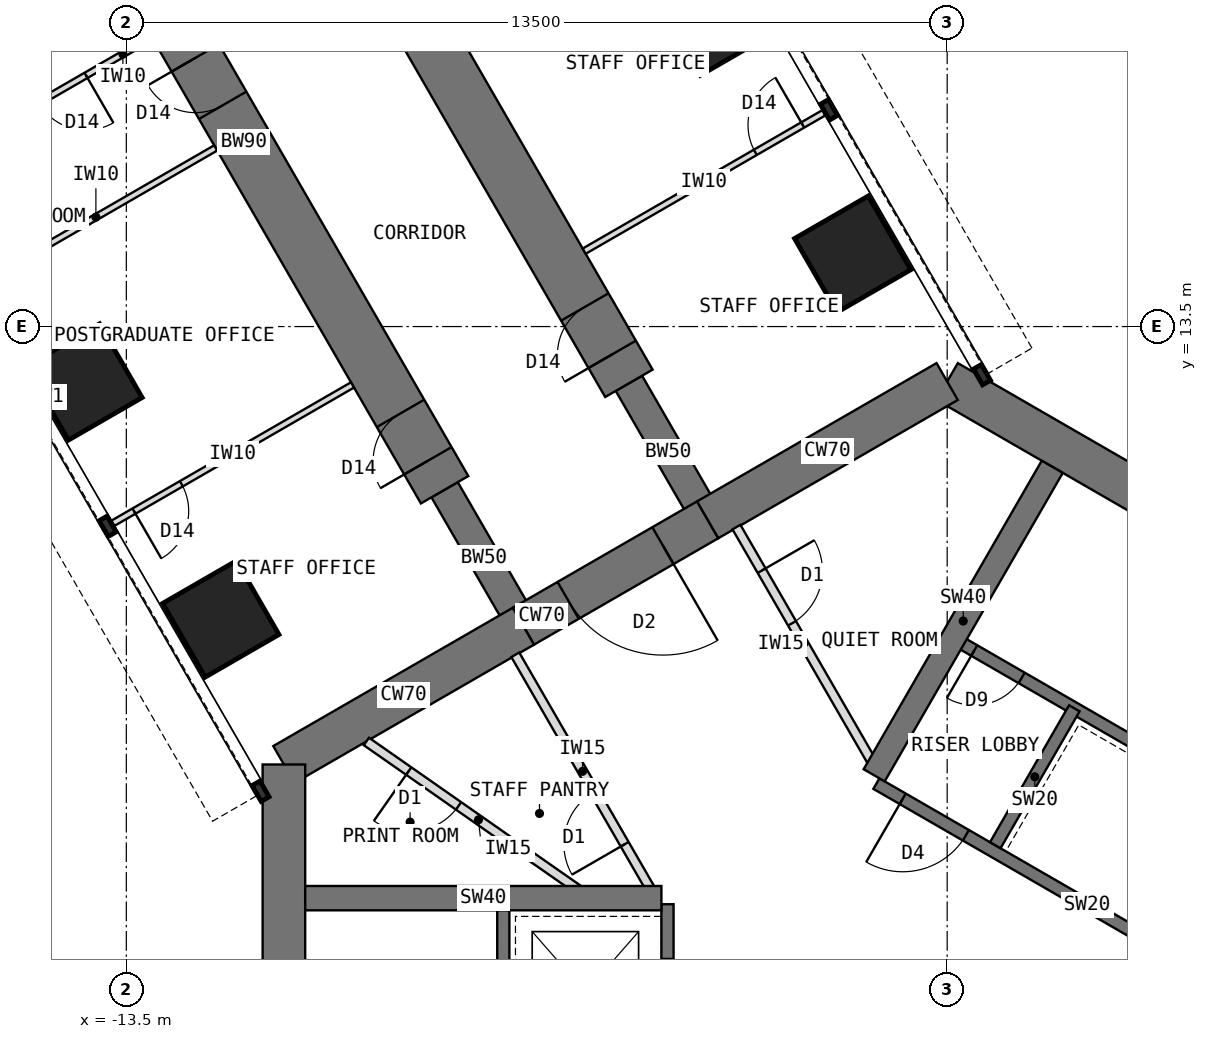
"""IFC4 building model, lengths in metres.
Left out: names, types, materials, properties, quantities, classifications, styles, units other than length and angle.
Written with IfcOpenShell. Run it as: python <this file> out.ifc"""

import sys

from ifc_helpers import new_model, si_unit, direction, frame, frame_2d, origin, origin_2d, place, context, subcontext, project, spatial, rectangle, extrude, element, fill, save


model = new_model("IFC4")
c1 = context("Model", 3, precision=1e-05, world=origin(), true_north=direction((0.0, 1.0)))
c2 = subcontext(c1, "Body", "Model", "MODEL_VIEW")
j1 = project(units=[si_unit("LENGTHUNIT", "METRE"), si_unit("PLANEANGLEUNIT", "RADIAN")], contexts=[c1])
p1 = place(None, origin())
s1 = spatial("IfcSite", under=j1, at=p1, CompositionType="ELEMENT")
p2 = place(p1, origin())
s2 = spatial("IfcBuilding", under=s1, at=p2, CompositionType="ELEMENT")
p3 = place(p2, frame((0.0, 0.0, 84.5)))
s3 = spatial("IfcBuildingStorey", under=s2, at=p3, CompositionType="ELEMENT", Elevation=84.5)
p4 = place(p3, frame((10.908, 6.298, 0.0), z_axis=(0.0, 0.0, 1.0), x_axis=(-0.866021940709, 0.500005998175, 0.0)))
e1 = element("IfcWall", 1, at=p4, inside=s3, PredefinedType="SHEAR", context=c2, shape_type="SweptSolid", body=[
    extrude(rectangle(XDim=12.596, YDim=0.7, at=frame_2d((6.298, 0.0))), origin(), (0.0, 0.0, 1.0), 4.0),
])
p5 = place(p3, frame((0.0, 12.596, 0.0), z_axis=(0.0, 0.0, 1.0), x_axis=(-0.866011268655, -0.500024481964, 0.0)))
e2 = element("IfcWall", 2, at=p5, inside=s3, PredefinedType="SHEAR", context=c2, shape_type="SweptSolid", body=[
    extrude(rectangle(XDim=4.548, YDim=0.7, at=frame_2d((2.274, 0.0))), origin(), (0.0, 0.0, 1.0), 4.0),
])
p6 = place(p3, frame((-3.939, 10.322, 0.0), z_axis=(0.0, 0.0, 1.0), x_axis=(-0.866019471182, -0.500010275428, 0.0)))
e3 = element("IfcWall", 3, at=p6, inside=s3, PredefinedType="SHEAR", context=c2, shape_type="SweptSolid", body=[
    extrude(rectangle(XDim=3.5, YDim=0.7, at=frame_2d((1.75, 0.0))), origin(), (0.0, 0.0, 1.0), 4.0),
])
p7 = place(p6, frame((0.85, 0.0, 0.0)))
e4 = element("IfcOpeningElement", 4, at=p7, cuts=e3, PredefinedType="OPENING", context=c2, shape_type="SweptSolid", body=[
    extrude(rectangle(XDim=1.8, YDim=2.1, at=frame_2d((0.9, 1.05))), frame((0.0, 0.36, 0.0), z_axis=(0.0, -1.0, 0.0), x_axis=(1.0, 0.0, 0.0)), (0.0, 0.0, 1.0), 0.72),
])
p8 = place(p3, frame((-6.97, 8.572, 0.0), z_axis=(0.0, 0.0, 1.0), x_axis=(-0.866034513004, -0.499984222037, 0.0)))
e5 = element("IfcWall", 5, at=p8, inside=s3, PredefinedType="SHEAR", context=c2, shape_type="SweptSolid", body=[
    extrude(rectangle(XDim=4.548, YDim=0.7, at=frame_2d((2.274, 0.0))), origin(), (0.0, 0.0, 1.0), 4.0),
])
p9 = place(p3, frame((-10.908, 6.298, 0.0), z_axis=(0.0, 0.0, 1.0), x_axis=(0.0, -1.0, 0.0)))
e6 = element("IfcWall", 6, at=p9, inside=s3, PredefinedType="SHEAR", context=c2, shape_type="SweptSolid", body=[
    extrude(rectangle(XDim=12.596, YDim=0.7, at=frame_2d((6.298, 0.0))), origin(), (0.0, 0.0, 1.0), 4.0),
])
p10 = place(p3, frame((-6.97, 8.572, 0.0), z_axis=(0.0, 0.0, 1.0), x_axis=(-0.499988811324, 0.866031863473, 0.0)))
e7 = element("IfcWall", 7, at=p10, inside=s3, PredefinedType="SHEAR", context=c2, shape_type="SweptSolid", body=[
    extrude(rectangle(XDim=2.592, YDim=0.5, at=frame_2d((1.296, 0.0))), origin(), (0.0, 0.0, 1.0), 4.0),
])
p11 = place(p3, frame((-8.266, 10.816, 0.0), z_axis=(0.0, 0.0, 1.0), x_axis=(-0.499996231654, 0.866027579429, 0.0)))
e8 = element("IfcWall", 8, at=p11, inside=s3, PredefinedType="SHEAR", context=c2, shape_type="SweptSolid", body=[
    extrude(rectangle(XDim=13.2, YDim=0.9, at=frame_2d((6.6, 0.0))), origin(), (0.0, 0.0, 1.0), 4.0),
])
p12 = place(p11, frame((0.55, 0.0, 0.0)))
e9 = element("IfcOpeningElement", 9, at=p12, cuts=e8, PredefinedType="OPENING", context=c2, shape_type="SweptSolid", body=[
    extrude(rectangle(XDim=0.9, YDim=2.1, at=frame_2d((0.45, 1.05))), frame((0.0, 0.46, 0.0), z_axis=(0.0, -1.0, 0.0), x_axis=(1.0, 0.0, 0.0)), (0.0, 0.0, 1.0), 0.92),
])
p13 = place(p11, frame((7.3, 0.0, 0.0)))
e10 = element("IfcOpeningElement", 10, at=p13, cuts=e8, PredefinedType="OPENING", context=c2, shape_type="SweptSolid", body=[
    extrude(rectangle(XDim=0.9, YDim=2.1, at=frame_2d((0.45, 1.05))), frame((0.0, 0.46, 0.0), z_axis=(0.0, -1.0, 0.0), x_axis=(1.0, 0.0, 0.0)), (0.0, 0.0, 1.0), 0.92),
])
p14 = place(p3, frame((-3.939, 10.322, 0.0), z_axis=(0.0, 0.0, 1.0), x_axis=(-0.499918158782, 0.866072649678, 0.0)))
e11 = element("IfcWall", 11, at=p14, inside=s3, PredefinedType="SHEAR", context=c2, shape_type="SweptSolid", body=[
    extrude(rectangle(XDim=2.592, YDim=0.5, at=frame_2d((1.296, 0.0))), origin(), (0.0, 0.0, 1.0), 4.0),
])
p15 = place(p3, frame((-5.234, 12.566, 0.0), z_axis=(0.0, 0.0, 1.0), x_axis=(-0.500010103361, 0.866019570528, 0.0)))
e12 = element("IfcWall", 12, at=p15, inside=s3, PredefinedType="SHEAR", context=c2, shape_type="SweptSolid", body=[
    extrude(rectangle(XDim=13.2, YDim=0.9, at=frame_2d((6.6, 0.0))), origin(), (0.0, 0.0, 1.0), 4.0),
])
p16 = place(p15, frame((0.55, 0.0, 0.0)))
e13 = element("IfcOpeningElement", 13, at=p16, cuts=e12, PredefinedType="OPENING", context=c2, shape_type="SweptSolid", body=[
    extrude(rectangle(XDim=0.9, YDim=2.1, at=frame_2d((0.45, 1.05))), frame((0.0, 0.46, 0.0), z_axis=(0.0, -1.0, 0.0), x_axis=(1.0, 0.0, 0.0)), (0.0, 0.0, 1.0), 0.92),
])
p17 = place(p15, frame((7.3, 0.0, 0.0)))
e14 = element("IfcOpeningElement", 14, at=p17, cuts=e12, PredefinedType="OPENING", context=c2, shape_type="SweptSolid", body=[
    extrude(rectangle(XDim=0.9, YDim=2.1, at=frame_2d((0.45, 1.05))), frame((0.0, 0.46, 0.0), z_axis=(0.0, -1.0, 0.0), x_axis=(1.0, 0.0, 0.0)), (0.0, 0.0, 1.0), 0.92),
])
for number, where, z_axis, x_axis in (
    (15, (-11.946, 8.691, 0.0), (0.0, 0.0, 1.0), (0.866, 0.5, 0.0)),
    (16, (-1.554, 14.691, 0.0), (0.0, 0.0, 1.0), (0.866, 0.5, 0.0)),
    (17, (-14.196, 12.588, 0.0), (0.0, 0.0, 1.0), (0.866, 0.5, 0.0)),
    (18, (-3.804, 18.588, 0.0), (0.0, 0.0, 1.0), (0.866, 0.5, 0.0)),
):
    element("IfcColumn", number, at=place(p3, frame(where, z_axis=z_axis, x_axis=x_axis)), inside=s3, PredefinedType="COLUMN", context=c2, shape_type="SweptSolid", body=[
        extrude(rectangle(XDim=1.4, YDim=1.4, at=origin_2d()), origin(), (0.0, 0.0, 1.0), 4.0),
    ])
p18 = place(p3, frame((5.764, 1.984, 0.0), z_axis=(0.0, 0.0, 1.0), x_axis=(-0.866026010844, 0.49999894854, 0.0)))
e19 = element("IfcWall", 19, at=p18, inside=s3, PredefinedType="SHEAR", context=c2, shape_type="SweptSolid", body=[
    extrude(rectangle(XDim=8.0, YDim=0.2, at=frame_2d((4.0, 0.0))), origin(), (0.0, 0.0, 1.0), 4.0),
])
p19 = place(p18, frame((6.3, 0.0, 0.0)))
e20 = element("IfcOpeningElement", 20, at=p19, cuts=e19, PredefinedType="OPENING", context=c2, shape_type="SweptSolid", body=[
    extrude(rectangle(XDim=1.2, YDim=2.1, at=frame_2d((0.6, 1.05))), frame((0.0, 0.11, 0.0), z_axis=(0.0, -1.0, 0.0), x_axis=(1.0, 0.0, 0.0)), (0.0, 0.0, 1.0), 0.22),
])
p20 = place(p3, frame((0.791, 4.97, 0.0), z_axis=(0.0, 0.0, 1.0), x_axis=(0.499936506574, 0.866062058628, 0.0)))
e21 = element("IfcWall", 21, at=p20, inside=s3, PredefinedType="SHEAR", context=c2, shape_type="SweptSolid", body=[
    extrude(rectangle(XDim=2.6, YDim=0.2, at=frame_2d((1.3, 0.0))), origin(), (0.0, 0.0, 1.0), 4.0),
])
p21 = place(p3, frame((7.114, 4.322, 0.0), z_axis=(0.0, 0.0, 1.0), x_axis=(-0.866026010844, 0.49999894854, 0.0)))
e22 = element("IfcWall", 22, at=p21, inside=s3, PredefinedType="SHEAR", context=c2, shape_type="SweptSolid", body=[
    extrude(rectangle(XDim=8.0, YDim=0.2, at=frame_2d((4.0, 0.0))), origin(), (0.0, 0.0, 1.0), 4.0),
])
p22 = place(p21, frame((6.8, 0.0, 0.0)))
e23 = element("IfcOpeningElement", 23, at=p22, cuts=e22, PredefinedType="OPENING", context=c2, shape_type="SweptSolid", body=[
    extrude(rectangle(XDim=0.9, YDim=2.1, at=frame_2d((0.45, 1.05))), frame((0.0, 0.11, 0.0), z_axis=(0.0, -1.0, 0.0), x_axis=(1.0, 0.0, 0.0)), (0.0, 0.0, 1.0), 0.22),
])
p23 = place(p3, frame((-1.201, 6.12, 0.0), z_axis=(0.0, 0.0, 1.0), x_axis=(0.500002627198, 0.866023886965, 0.0)))
e24 = element("IfcWall", 24, at=p23, inside=s3, PredefinedType="SHEAR", context=c2, shape_type="SweptSolid", body=[
    extrude(rectangle(XDim=5.858, YDim=0.4, at=frame_2d((2.929, 0.0))), origin(), (0.0, 0.0, 1.0), 4.0),
])
p24 = place(p3, frame((-4.6, 4.0, 0.0), z_axis=(0.0, 0.0, 1.0), x_axis=(0.0, -1.0, 0.0)))
e25 = element("IfcWall", 25, at=p24, inside=s3, PredefinedType="SHEAR", context=c2, shape_type="SweptSolid", body=[
    extrude(rectangle(XDim=8.0, YDim=0.2, at=frame_2d((4.0, 0.0))), origin(), (0.0, 0.0, 1.0), 4.0),
])
p25 = place(p24, frame((6.3, 0.0, 0.0)))
e26 = element("IfcOpeningElement", 26, at=p25, cuts=e25, PredefinedType="OPENING", context=c2, shape_type="SweptSolid", body=[
    extrude(rectangle(XDim=1.2, YDim=2.1, at=frame_2d((0.6, 1.05))), frame((0.0, 0.11, 0.0), z_axis=(0.0, -1.0, 0.0), x_axis=(1.0, 0.0, 0.0)), (0.0, 0.0, 1.0), 0.22),
])
p26 = place(p24, frame((0.9, 0.0, 0.0)))
e27 = element("IfcOpeningElement", 27, at=p26, cuts=e25, PredefinedType="OPENING", context=c2, shape_type="SweptSolid", body=[
    extrude(rectangle(XDim=1.1, YDim=2.2, at=frame_2d((0.55, 1.1))), frame((0.0, 0.11, 0.0), z_axis=(0.0, -1.0, 0.0), x_axis=(1.0, 0.0, 0.0)), (0.0, 0.0, 1.0), 0.22),
])
p27 = place(p3, frame((-7.3, 4.0, 0.0), z_axis=(0.0, 0.0, 1.0), x_axis=(0.0, -1.0, 0.0)))
e28 = element("IfcWall", 28, at=p27, inside=s3, PredefinedType="SHEAR", context=c2, shape_type="SweptSolid", body=[
    extrude(rectangle(XDim=8.0, YDim=0.2, at=frame_2d((4.0, 0.0))), origin(), (0.0, 0.0, 1.0), 4.0),
])
p28 = place(p27, frame((6.7, 0.0, 0.0)))
e29 = element("IfcOpeningElement", 29, at=p28, cuts=e28, PredefinedType="OPENING", context=c2, shape_type="SweptSolid", body=[
    extrude(rectangle(XDim=1.1, YDim=2.1, at=frame_2d((0.55, 1.05))), frame((0.0, 0.11, 0.0), z_axis=(0.0, -1.0, 0.0), x_axis=(1.0, 0.0, 0.0)), (0.0, 0.0, 1.0), 0.22),
])
p29 = place(p3, frame((-4.7, 4.1, 0.0), z_axis=(0.0, 0.0, 1.0), x_axis=(-1.0, 0.0, 0.0)))
e30 = element("IfcWall", 30, at=p29, inside=s3, PredefinedType="SHEAR", context=c2, shape_type="SweptSolid", body=[
    extrude(rectangle(XDim=5.858, YDim=0.4, at=frame_2d((2.929, 0.0))), origin(), (0.0, 0.0, 1.0), 4.0),
])
p30 = place(p3, frame((-9.78, 12.54, 0.0), z_axis=(0.0, 0.0, 1.0), x_axis=(-0.866035472144, -0.499982560684, 0.0)))
e31 = element("IfcWall", 31, at=p30, inside=s3, PredefinedType="PARTITIONING", context=c2, shape_type="SweptSolid", body=[
    extrude(rectangle(XDim=4.55, YDim=0.1, at=frame_2d((2.275, 0.0))), origin(), (0.0, 0.0, 1.0), 3.8),
])
p31 = place(p30, frame((3.25, 0.0, 0.0)))
e32 = element("IfcOpeningElement", 32, at=p31, cuts=e31, PredefinedType="OPENING", context=c2, shape_type="SweptSolid", body=[
    extrude(rectangle(XDim=0.9, YDim=2.1, at=frame_2d((0.45, 1.05))), frame((0.0, 0.06, 0.0), z_axis=(0.0, -1.0, 0.0), x_axis=(1.0, 0.0, 0.0)), (0.0, 0.0, 1.0), 0.12),
])
p32 = place(p3, frame((-12.03, 16.437, 0.0), z_axis=(0.0, 0.0, 1.0), x_axis=(-0.866035472144, -0.499982560684, 0.0)))
e33 = element("IfcWall", 33, at=p32, inside=s3, PredefinedType="PARTITIONING", context=c2, shape_type="SweptSolid", body=[
    extrude(rectangle(XDim=4.55, YDim=0.1, at=frame_2d((2.275, 0.0))), origin(), (0.0, 0.0, 1.0), 3.8),
])
p33 = place(p3, frame((-13.08, 18.256, 0.0), z_axis=(0.0, 0.0, 1.0), x_axis=(-0.866020560687, -0.500008388397, 0.0)))
e34 = element("IfcWall", 34, at=p33, inside=s3, PredefinedType="PARTITIONING", context=c2, shape_type="SweptSolid", body=[
    extrude(rectangle(XDim=3.4, YDim=0.1, at=frame_2d((1.7, 0.0))), origin(), (0.0, 0.0, 1.0), 3.8),
])
p34 = place(p33, frame((1.25, 0.0, 0.0)))
e35 = element("IfcOpeningElement", 35, at=p34, cuts=e34, PredefinedType="OPENING", context=c2, shape_type="SweptSolid", body=[
    extrude(rectangle(XDim=0.9, YDim=2.1, at=frame_2d((0.45, 1.05))), frame((0.0, 0.06, 0.0), z_axis=(0.0, -1.0, 0.0), x_axis=(1.0, 0.0, 0.0)), (0.0, 0.0, 1.0), 0.12),
])
p35 = place(p3, frame((-5.97, 14.74, 0.0), z_axis=(0.0, 0.0, 1.0), x_axis=(0.866035472144, 0.499982560684, 0.0)))
e36 = element("IfcWall", 36, at=p35, inside=s3, PredefinedType="PARTITIONING", context=c2, shape_type="SweptSolid", body=[
    extrude(rectangle(XDim=4.55, YDim=0.1, at=frame_2d((2.275, 0.0))), origin(), (0.0, 0.0, 1.0), 3.8),
])
p36 = place(p35, frame((3.25, 0.0, 0.0)))
e37 = element("IfcOpeningElement", 37, at=p36, cuts=e36, PredefinedType="OPENING", context=c2, shape_type="SweptSolid", body=[
    extrude(rectangle(XDim=0.9, YDim=2.1, at=frame_2d((0.45, 1.05))), frame((0.0, 0.06, 0.0), z_axis=(0.0, -1.0, 0.0), x_axis=(1.0, 0.0, 0.0)), (0.0, 0.0, 1.0), 0.12),
])
p37 = place(p3, frame((-4.89, 4.27, 0.0), z_axis=(0.0, 0.0, 1.0), x_axis=(-0.500007369519, 0.866021148949, 0.0)))
e38 = element("IfcWall", 38, at=p37, inside=s3, PredefinedType="PARTITIONING", context=c2, shape_type="SweptSolid", body=[
    extrude(rectangle(XDim=4.426, YDim=0.15, at=frame_2d((2.213, 0.0))), origin(), (0.0, 0.0, 1.0), 3.8),
])
p38 = place(p37, frame((0.828, 0.0, 0.0)))
e39 = element("IfcOpeningElement", 39, at=p38, cuts=e38, PredefinedType="OPENING", context=c2, shape_type="SweptSolid", body=[
    extrude(rectangle(XDim=1.0, YDim=2.1, at=frame_2d((0.5, 1.05))), frame((0.0, 0.085, 0.0), z_axis=(0.0, -1.0, 0.0), x_axis=(1.0, 0.0, 0.0)), (0.0, 0.0, 1.0), 0.17),
])
p39 = place(p3, frame((-3.466, 10.202, 0.0), z_axis=(0.0, 0.0, 1.0), x_axis=(0.500007369519, -0.866021148949, 0.0)))
e40 = element("IfcWall", 40, at=p39, inside=s3, PredefinedType="PARTITIONING", context=c2, shape_type="SweptSolid", body=[
    extrude(rectangle(XDim=4.426, YDim=0.15, at=frame_2d((2.213, 0.0))), origin(), (0.0, 0.0, 1.0), 3.8),
])
p40 = place(p39, frame((0.828, 0.0, 0.0)))
e41 = element("IfcOpeningElement", 41, at=p40, cuts=e40, PredefinedType="OPENING", context=c2, shape_type="SweptSolid", body=[
    extrude(rectangle(XDim=1.0, YDim=2.1, at=frame_2d((0.5, 1.05))), frame((0.0, 0.085, 0.0), z_axis=(0.0, -1.0, 0.0), x_axis=(1.0, 0.0, 0.0)), (0.0, 0.0, 1.0), 0.17),
])
p41 = place(p3, frame((-5.865, 4.1, 0.0), z_axis=(0.0, 0.0, 1.0), x_axis=(-0.819614241928, 0.572915783016, 0.0)))
e42 = element("IfcWall", 42, at=p41, inside=s3, PredefinedType="PARTITIONING", context=c2, shape_type="SweptSolid", body=[
    extrude(rectangle(XDim=4.498, YDim=0.15, at=frame_2d((2.249, 0.0))), origin(), (0.0, 0.0, 1.0), 3.8),
])
p42 = place(p41, frame((2.648, 0.0, 0.0)))
e43 = element("IfcOpeningElement", 43, at=p42, cuts=e42, PredefinedType="OPENING", context=c2, shape_type="SweptSolid", body=[
    extrude(rectangle(XDim=1.0, YDim=2.1, at=frame_2d((0.5, 1.05))), frame((0.0, 0.085, 0.0), z_axis=(0.0, -1.0, 0.0), x_axis=(1.0, 0.0, 0.0)), (0.0, 0.0, 1.0), 0.17),
])
p43 = place(p19, origin())
e44 = element("IfcDoor", 44, at=p43, inside=s3, OperationType="SINGLE_SWING_RIGHT", PredefinedType="DOOR", context=c2, shape_type="SweptSolid", body=[
    extrude(rectangle(XDim=1.2, YDim=2.1, at=frame_2d((0.6, 1.05))), frame((0.0, 0.025, 0.0), z_axis=(0.0, -1.0, 0.0), x_axis=(1.0, 0.0, 0.0)), (0.0, 0.0, 1.0), 0.05),
])
fill(e20, e44)
p44 = place(p22, origin())
e45 = element("IfcDoor", 45, at=p44, inside=s3, OperationType="SINGLE_SWING_RIGHT", PredefinedType="DOOR", context=c2, shape_type="SweptSolid", body=[
    extrude(rectangle(XDim=0.9, YDim=2.1, at=frame_2d((0.45, 1.05))), frame((0.0, 0.025, 0.0), z_axis=(0.0, -1.0, 0.0), x_axis=(1.0, 0.0, 0.0)), (0.0, 0.0, 1.0), 0.05),
])
fill(e23, e45)
p45 = place(p7, origin())
e46 = element("IfcDoor", 46, at=p45, inside=s3, OperationType="DOUBLE_DOOR_DOUBLE_SWING", PredefinedType="DOOR", context=c2, shape_type="SweptSolid", body=[
    extrude(rectangle(XDim=1.72, YDim=2.06, at=frame_2d((0.9, 1.03))), frame((0.0, 0.025, 0.0), z_axis=(0.0, -1.0, 0.0), x_axis=(1.0, 0.0, 0.0)), (0.0, 0.0, 1.0), 0.05),
    extrude(rectangle(XDim=0.04, YDim=2.1, at=frame_2d((0.02, 1.05))), frame((0.0, 0.35, 0.0), z_axis=(0.0, -1.0, 0.0), x_axis=(1.0, 0.0, 0.0)), (0.0, 0.0, 1.0), 0.699),
    extrude(rectangle(XDim=0.04, YDim=2.1, at=frame_2d((1.78, 1.05))), frame((0.0, 0.35, 0.0), z_axis=(0.0, -1.0, 0.0), x_axis=(1.0, 0.0, 0.0)), (0.0, 0.0, 1.0), 0.699),
    extrude(rectangle(XDim=1.72, YDim=0.04, at=frame_2d((0.9, 2.08))), frame((0.0, 0.35, 0.0), z_axis=(0.0, -1.0, 0.0), x_axis=(1.0, 0.0, 0.0)), (0.0, 0.0, 1.0), 0.699),
])
fill(e4, e46)
p46 = place(p31, origin())
e47 = element("IfcDoor", 47, at=p46, inside=s3, OperationType="SINGLE_SWING_RIGHT", PredefinedType="DOOR", context=c2, shape_type="SweptSolid", body=[
    extrude(rectangle(XDim=0.9, YDim=2.1, at=frame_2d((0.45, 1.05))), frame((0.0, 0.025, 0.0), z_axis=(0.0, -1.0, 0.0), x_axis=(1.0, 0.0, 0.0)), (0.0, 0.0, 1.0), 0.05),
])
fill(e32, e47)
p47 = place(p34, origin())
e48 = element("IfcDoor", 48, at=p47, inside=s3, OperationType="SINGLE_SWING_LEFT", PredefinedType="DOOR", context=c2, shape_type="SweptSolid", body=[
    extrude(rectangle(XDim=0.9, YDim=2.1, at=frame_2d((0.45, 1.05))), frame((0.0, 0.025, 0.0), z_axis=(0.0, -1.0, 0.0), x_axis=(1.0, 0.0, 0.0)), (0.0, 0.0, 1.0), 0.05),
])
fill(e35, e48)
p48 = place(p36, origin())
e49 = element("IfcDoor", 49, at=p48, inside=s3, OperationType="SINGLE_SWING_RIGHT", PredefinedType="DOOR", context=c2, shape_type="SweptSolid", body=[
    extrude(rectangle(XDim=0.9, YDim=2.1, at=frame_2d((0.45, 1.05))), frame((0.0, 0.025, 0.0), z_axis=(0.0, -1.0, 0.0), x_axis=(1.0, 0.0, 0.0)), (0.0, 0.0, 1.0), 0.05),
])
fill(e37, e49)
p49 = place(p40, origin())
e50 = element("IfcDoor", 50, at=p49, inside=s3, OperationType="SINGLE_SWING_LEFT", PredefinedType="DOOR", context=c2, shape_type="SweptSolid", body=[
    extrude(rectangle(XDim=1.0, YDim=2.1, at=frame_2d((0.5, 1.05))), frame((0.0, 0.025, 0.0), z_axis=(0.0, -1.0, 0.0), x_axis=(1.0, 0.0, 0.0)), (0.0, 0.0, 1.0), 0.05),
])
fill(e41, e50)
p50 = place(p42, origin())
e51 = element("IfcDoor", 51, at=p50, inside=s3, OperationType="SINGLE_SWING_RIGHT", PredefinedType="DOOR", context=c2, shape_type="SweptSolid", body=[
    extrude(rectangle(XDim=1.0, YDim=2.1, at=frame_2d((0.5, 1.05))), frame((0.0, 0.025, 0.0), z_axis=(0.0, -1.0, 0.0), x_axis=(1.0, 0.0, 0.0)), (0.0, 0.0, 1.0), 0.05),
])
fill(e43, e51)
p51 = place(p38, origin())
e52 = element("IfcDoor", 52, at=p51, inside=s3, OperationType="SINGLE_SWING_LEFT", PredefinedType="DOOR", context=c2, shape_type="SweptSolid", body=[
    extrude(rectangle(XDim=1.0, YDim=2.1, at=frame_2d((0.5, 1.05))), frame((0.0, 0.025, 0.0), z_axis=(0.0, -1.0, 0.0), x_axis=(1.0, 0.0, 0.0)), (0.0, 0.0, 1.0), 0.05),
])
fill(e39, e52)
p52 = place(p12, origin())
e53 = element("IfcDoor", 53, at=p52, inside=s3, OperationType="SINGLE_SWING_LEFT", PredefinedType="DOOR", context=c2, shape_type="SweptSolid", body=[
    extrude(rectangle(XDim=0.82, YDim=2.06, at=frame_2d((0.45, 1.03))), frame((0.0, 0.025, 0.0), z_axis=(0.0, -1.0, 0.0), x_axis=(1.0, 0.0, 0.0)), (0.0, 0.0, 1.0), 0.05),
    extrude(rectangle(XDim=0.04, YDim=2.1, at=frame_2d((0.02, 1.05))), frame((0.0, 0.45, 0.0), z_axis=(0.0, -1.0, 0.0), x_axis=(1.0, 0.0, 0.0)), (0.0, 0.0, 1.0), 0.899),
    extrude(rectangle(XDim=0.04, YDim=2.1, at=frame_2d((0.88, 1.05))), frame((0.0, 0.45, 0.0), z_axis=(0.0, -1.0, 0.0), x_axis=(1.0, 0.0, 0.0)), (0.0, 0.0, 1.0), 0.899),
    extrude(rectangle(XDim=0.82, YDim=0.04, at=frame_2d((0.45, 2.08))), frame((0.0, 0.45, 0.0), z_axis=(0.0, -1.0, 0.0), x_axis=(1.0, 0.0, 0.0)), (0.0, 0.0, 1.0), 0.899),
])
fill(e9, e53)
p53 = place(p13, origin())
e54 = element("IfcDoor", 54, at=p53, inside=s3, OperationType="SINGLE_SWING_RIGHT", PredefinedType="DOOR", context=c2, shape_type="SweptSolid", body=[
    extrude(rectangle(XDim=0.82, YDim=2.06, at=frame_2d((0.45, 1.03))), frame((0.0, 0.025, 0.0), z_axis=(0.0, -1.0, 0.0), x_axis=(1.0, 0.0, 0.0)), (0.0, 0.0, 1.0), 0.05),
    extrude(rectangle(XDim=0.04, YDim=2.1, at=frame_2d((0.02, 1.05))), frame((0.0, 0.45, 0.0), z_axis=(0.0, -1.0, 0.0), x_axis=(1.0, 0.0, 0.0)), (0.0, 0.0, 1.0), 0.899),
    extrude(rectangle(XDim=0.04, YDim=2.1, at=frame_2d((0.88, 1.05))), frame((0.0, 0.45, 0.0), z_axis=(0.0, -1.0, 0.0), x_axis=(1.0, 0.0, 0.0)), (0.0, 0.0, 1.0), 0.899),
    extrude(rectangle(XDim=0.82, YDim=0.04, at=frame_2d((0.45, 2.08))), frame((0.0, 0.45, 0.0), z_axis=(0.0, -1.0, 0.0), x_axis=(1.0, 0.0, 0.0)), (0.0, 0.0, 1.0), 0.899),
])
fill(e10, e54)
p54 = place(p16, origin())
e55 = element("IfcDoor", 55, at=p54, inside=s3, OperationType="SINGLE_SWING_LEFT", PredefinedType="DOOR", context=c2, shape_type="SweptSolid", body=[
    extrude(rectangle(XDim=0.82, YDim=2.06, at=frame_2d((0.45, 1.03))), frame((0.0, 0.025, 0.0), z_axis=(0.0, -1.0, 0.0), x_axis=(1.0, 0.0, 0.0)), (0.0, 0.0, 1.0), 0.05),
    extrude(rectangle(XDim=0.04, YDim=2.1, at=frame_2d((0.02, 1.05))), frame((0.0, 0.45, 0.0), z_axis=(0.0, -1.0, 0.0), x_axis=(1.0, 0.0, 0.0)), (0.0, 0.0, 1.0), 0.899),
    extrude(rectangle(XDim=0.04, YDim=2.1, at=frame_2d((0.88, 1.05))), frame((0.0, 0.45, 0.0), z_axis=(0.0, -1.0, 0.0), x_axis=(1.0, 0.0, 0.0)), (0.0, 0.0, 1.0), 0.899),
    extrude(rectangle(XDim=0.82, YDim=0.04, at=frame_2d((0.45, 2.08))), frame((0.0, 0.45, 0.0), z_axis=(0.0, -1.0, 0.0), x_axis=(1.0, 0.0, 0.0)), (0.0, 0.0, 1.0), 0.899),
])
fill(e13, e55)
save(model, sys.argv[1])
